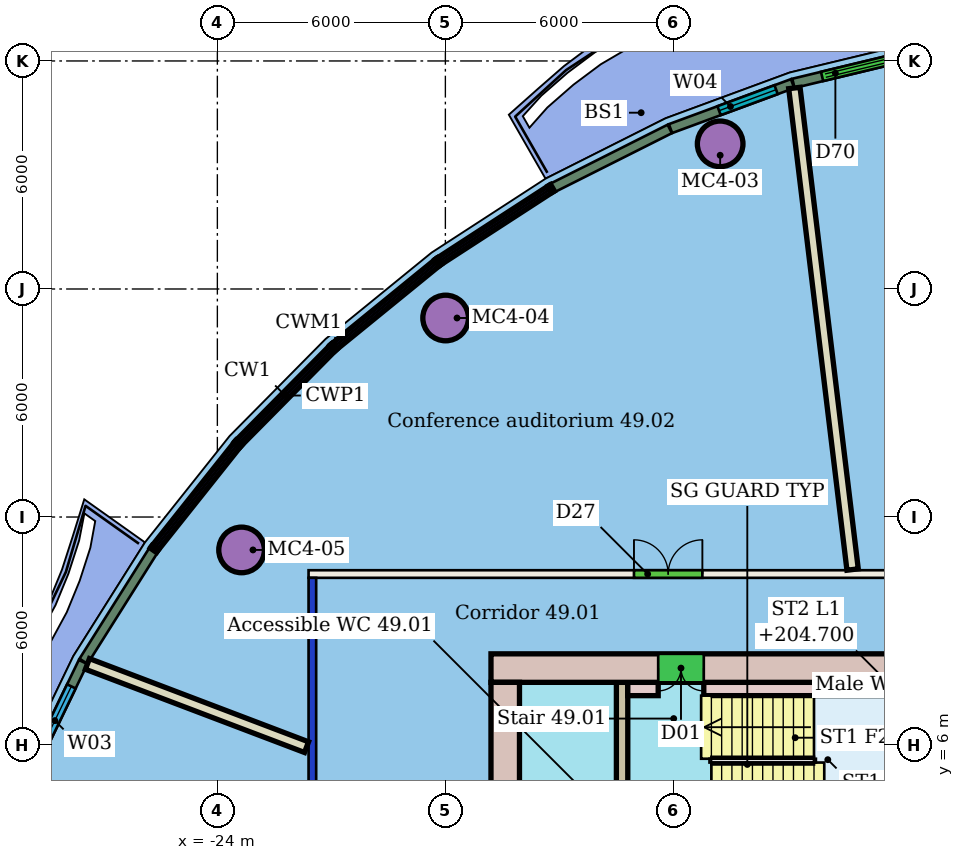
"""IFC4 building model, lengths in metres.
Left out: names, types, materials, properties, quantities, classifications, styles, units other than length and angle.
Written with IfcOpenShell. Run it as: python <this file> out.ifc"""

import sys

from ifc_helpers import new_model, si_unit, direction, frame, frame_2d, origin, origin_2d, place, context, subcontext, project, spatial, rectangle, hollow_circle, extrude, element, fill, save


model = new_model("IFC4")
c1 = context("Model", 3, precision=1e-05, world=origin(), true_north=direction((0.0, 1.0)))
c2 = subcontext(c1, "Body", "Model", "MODEL_VIEW")
j1 = project(units=[si_unit("LENGTHUNIT", "METRE"), si_unit("PLANEANGLEUNIT", "RADIAN")], contexts=[c1])
p1 = place(None, origin())
s1 = spatial("IfcSite", under=j1, at=p1, CompositionType="ELEMENT")
p2 = place(p1, origin())
s2 = spatial("IfcBuilding", under=s1, at=p2, CompositionType="ELEMENT")
p3 = place(p2, frame((0.0, 0.0, 202.9)))
s3 = spatial("IfcBuildingStorey", under=s2, at=p3, CompositionType="ELEMENT", Elevation=202.9)
for number, where, z_axis, x_axis in (
    (1, (-10.769, 21.819, 0.0), (0.0, 0.0, 1.0), (1.0, 0.0, 0.0)),
    (2, (-17.993, 17.237, 0.0), (0.0, 0.0, 1.0), (1.0, 0.0, 0.0)),
    (3, (-23.363, 11.134, 0.0), (0.0, 0.0, 1.0), (1.0, 0.0, 0.0)),
):
    element("IfcColumn", number, at=place(p3, frame(where, z_axis=z_axis, x_axis=x_axis)), inside=s3, PredefinedType="COLUMN", context=c2, shape_type="SweptSolid", body=[
        extrude(hollow_circle(Radius=0.6, WallThickness=0.045, at=origin_2d()), origin(), (0.0, 0.0, 1.0), 3.45),
    ])
p4 = place(p3, frame((-21.5, -10.4, 0.0), z_axis=(0.0, 0.0, 1.0), x_axis=(0.0, 1.0, 0.0)))
e4 = element("IfcWall", 4, at=p4, inside=s3, PredefinedType="PARTITIONING", context=c2, shape_type="SweptSolid", body=[
    extrude(rectangle(XDim=20.8, YDim=0.2, at=frame_2d((10.4, 0.0))), origin(), (0.0, 0.0, 1.0), 3.05),
])
p5 = place(p4, frame((10.391, 0.0, 0.0)))
e5 = element("IfcOpeningElement", 5, at=p5, cuts=e4, PredefinedType="OPENING", context=c2, shape_type="SweptSolid", body=[
    extrude(rectangle(XDim=1.8, YDim=2.4, at=frame_2d((0.9, 1.2))), frame((0.0, 0.11, 0.0), z_axis=(0.0, -1.0, 0.0), x_axis=(1.0, 0.0, 0.0)), (0.0, 0.0, 1.0), 0.22),
])
p6 = place(p3, frame((-21.6, 10.5, 0.0), z_axis=(0.0, 0.0, 1.0), x_axis=(1.0, 0.0, 0.0)))
e6 = element("IfcWall", 6, at=p6, inside=s3, PredefinedType="PARTITIONING", context=c2, shape_type="SweptSolid", body=[
    extrude(rectangle(XDim=31.2, YDim=0.2, at=frame_2d((15.6, 0.0))), origin(), (0.0, 0.0, 1.0), 3.45),
])
p7 = place(p6, frame((18.102, 0.0, 0.0)))
e7 = element("IfcOpeningElement", 7, at=p7, cuts=e6, PredefinedType="OPENING", context=c2, shape_type="SweptSolid", body=[
    extrude(rectangle(XDim=1.5, YDim=2.1, at=frame_2d((0.75, 1.05))), frame((0.0, 0.11, 0.0), z_axis=(0.0, -1.0, 0.0), x_axis=(1.0, 0.0, 0.0)), (0.0, 0.0, 1.0), 0.22),
])
p8 = place(p6, frame((8.563, 0.0, 0.0)))
e8 = element("IfcOpeningElement", 8, at=p8, cuts=e6, PredefinedType="OPENING", context=c2, shape_type="SweptSolid", body=[
    extrude(rectangle(XDim=1.8, YDim=2.4, at=frame_2d((0.9, 1.2))), frame((0.0, 0.11, 0.0), z_axis=(0.0, -1.0, 0.0), x_axis=(1.0, 0.0, 0.0)), (0.0, 0.0, 1.0), 0.22),
])
p9 = place(p6, frame((24.077, 0.0, 0.0)))
e9 = element("IfcOpeningElement", 9, at=p9, cuts=e6, PredefinedType="OPENING", context=c2, shape_type="SweptSolid", body=[
    extrude(rectangle(XDim=1.8, YDim=2.1, at=frame_2d((0.9, 1.05))), frame((0.0, 0.11, 0.0), z_axis=(0.0, -1.0, 0.0), x_axis=(1.0, 0.0, 0.0)), (0.0, 0.0, 1.0), 0.22),
])
p10 = place(p3, frame((-8.816, 23.289, 0.0), z_axis=(0.0, 0.0, 1.0), x_axis=(0.120069156686, -0.992765530029, 0.0)))
e10 = element("IfcWall", 10, at=p10, inside=s3, PredefinedType="PARTITIONING", context=c2, shape_type="SweptSolid", body=[
    extrude(rectangle(XDim=12.763, YDim=0.3, at=frame_2d((6.382, 0.0))), origin(), (0.0, 0.0, 1.0), 3.45),
])
p11 = place(p3, frame((-27.419, 8.134, 0.0), z_axis=(0.0, 0.0, 1.0), x_axis=(0.934858486825, -0.355020576322, 0.0)))
e11 = element("IfcWall", 11, at=p11, inside=s3, PredefinedType="PARTITIONING", context=c2, shape_type="SweptSolid", body=[
    extrude(rectangle(XDim=6.167, YDim=0.3, at=frame_2d((3.083, 0.0))), origin(), (0.0, 0.0, 1.0), 3.45),
])
p12 = place(p3, frame((-5.583, 24.196, 0.0), z_axis=(0.0, 0.0, 1.0), x_axis=(-0.972213814668, -0.234094635926, 0.0)))
e12 = element("IfcWall", 12, at=p12, inside=s3, PredefinedType="SOLIDWALL", context=c2, shape_type="SweptSolid", body=[
    extrude(rectangle(XDim=3.352, YDim=0.25, at=frame_2d((1.676, 0.0))), origin(), (0.0, 0.0, 1.0), 3.1),
])
p13 = place(p12, frame((0.776, 0.0, 0.0)))
e13 = element("IfcOpeningElement", 13, at=p13, cuts=e12, PredefinedType="OPENING", context=c2, shape_type="SweptSolid", body=[
    extrude(rectangle(XDim=1.8, YDim=2.4, at=frame_2d((0.9, 1.2))), frame((0.0, 0.135, 0.0), z_axis=(0.0, -1.0, 0.0), x_axis=(1.0, 0.0, 0.0)), (0.0, 0.0, 1.0), 0.27),
])
p14 = place(p3, frame((-8.863, 23.404, 0.0), z_axis=(0.0, 0.0, 1.0), x_axis=(-0.93828100614, -0.345873898288, 0.0)))
e14 = element("IfcWall", 14, at=p14, inside=s3, PredefinedType="SOLIDWALL", context=c2, shape_type="SweptSolid", body=[
    extrude(rectangle(XDim=3.423, YDim=0.25, at=frame_2d((1.712, 0.0))), origin(), (0.0, 0.0, 1.0), 3.1),
])
p15 = place(p14, frame((0.462, 0.0, 0.9)))
e15 = element("IfcOpeningElement", 15, at=p15, cuts=e14, PredefinedType="OPENING", context=c2, shape_type="SweptSolid", body=[
    extrude(rectangle(XDim=1.6, YDim=2.1, at=frame_2d((0.8, 1.05))), frame((0.0, 0.135, 0.0), z_axis=(0.0, -1.0, 0.0), x_axis=(1.0, 0.0, 0.0)), (0.0, 0.0, 1.0), 0.27),
])
for number, where, z_axis, x_axis in (
    (16, (-12.096, 22.211, 0.0), (0.0, 0.0, 1.0), (-0.893, -0.449, 0.0)),
    (17, (-25.69, 11.112, 0.0), (0.0, 0.0, 1.0), (-0.533, -0.846, 0.0)),
):
    element("IfcWall", number, at=place(p3, frame(where, z_axis=z_axis, x_axis=x_axis)), inside=s3, PredefinedType="SOLIDWALL", context=c2, shape_type="SweptSolid", body=[
        extrude(rectangle(XDim=3.437, YDim=0.25, at=frame_2d((1.718, 0.0))), origin(), (0.0, 0.0, 1.0), 3.1),
    ])
p16 = place(p3, frame((-27.533, 8.185, 0.0), z_axis=(0.0, 0.0, 1.0), x_axis=(-0.434561601859, -0.900642112156, 0.0)))
e18 = element("IfcWall", 18, at=p16, inside=s3, PredefinedType="SOLIDWALL", context=c2, shape_type="SweptSolid", body=[
    extrude(rectangle(XDim=3.424, YDim=0.25, at=frame_2d((1.712, 0.0))), origin(), (0.0, 0.0, 1.0), 3.1),
])
p17 = place(p16, frame((0.712, 0.0, 0.9)))
e19 = element("IfcOpeningElement", 19, at=p17, cuts=e18, PredefinedType="OPENING", context=c2, shape_type="SweptSolid", body=[
    extrude(rectangle(XDim=2.0, YDim=2.1, at=frame_2d((1.0, 1.05))), frame((0.0, 0.135, 0.0), z_axis=(0.0, -1.0, 0.0), x_axis=(1.0, 0.0, 0.0)), (0.0, 0.0, 1.0), 0.27),
])
p18 = place(p3, frame((-6.0, 8.025, 0.0), z_axis=(0.0, 0.0, 1.0), x_axis=(-1.0, 0.0, 0.0)))
e20 = element("IfcWall", 20, at=p18, inside=s3, PredefinedType="SHEAR", context=c2, shape_type="SweptSolid", body=[
    extrude(rectangle(XDim=10.8, YDim=0.75, at=frame_2d((5.4, 0.0))), origin(), (0.0, 0.0, 1.0), 3.3),
])
p19 = place(p18, frame((5.2, 0.0, 0.0)))
e21 = element("IfcOpeningElement", 21, at=p19, cuts=e20, PredefinedType="OPENING", context=c2, shape_type="SweptSolid", body=[
    extrude(rectangle(XDim=1.2, YDim=2.1, at=frame_2d((0.6, 1.05))), frame((0.0, 0.385, 0.0), z_axis=(0.0, -1.0, 0.0), x_axis=(1.0, 0.0, 0.0)), (0.0, 0.0, 1.0), 0.77),
])
p20 = place(p3, frame((-16.425, 7.65, 0.0), z_axis=(0.0, 0.0, 1.0), x_axis=(0.0, -1.0, 0.0)))
e22 = element("IfcWall", 22, at=p20, inside=s3, PredefinedType="SHEAR", context=c2, shape_type="SweptSolid", body=[
    extrude(rectangle(XDim=15.3, YDim=0.75, at=frame_2d((7.65, 0.0))), origin(), (0.0, 0.0, 1.0), 3.3),
])
p21 = place(p20, frame((11.25, 0.0, 0.0)))
e23 = element("IfcOpeningElement", 23, at=p21, cuts=e22, PredefinedType="OPENING", context=c2, shape_type="SweptSolid", body=[
    extrude(rectangle(XDim=1.2, YDim=2.1, at=frame_2d((0.6, 1.05))), frame((0.0, 0.385, 0.0), z_axis=(0.0, -1.0, 0.0), x_axis=(1.0, 0.0, 0.0)), (0.0, 0.0, 1.0), 0.77),
])
p22 = place(p20, frame((2.85, 0.0, 0.0)))
e24 = element("IfcOpeningElement", 24, at=p22, cuts=e22, PredefinedType="OPENING", context=c2, shape_type="SweptSolid", body=[
    extrude(rectangle(XDim=1.2, YDim=2.1, at=frame_2d((0.6, 1.05))), frame((0.0, 0.385, 0.0), z_axis=(0.0, -1.0, 0.0), x_axis=(1.0, 0.0, 0.0)), (0.0, 0.0, 1.0), 0.77),
])
p23 = place(p3, frame((-13.35, 7.65, 0.0), z_axis=(0.0, 0.0, 1.0), x_axis=(0.0, -1.0, 0.0)))
e25 = element("IfcWall", 25, at=p23, inside=s3, PredefinedType="SHEAR", context=c2, shape_type="SweptSolid", body=[
    extrude(rectangle(XDim=15.3, YDim=0.3, at=frame_2d((7.65, 0.0))), origin(), (0.0, 0.0, 1.0), 3.3),
])
p24 = place(p23, frame((6.9, 0.0, 0.0)))
e26 = element("IfcOpeningElement", 26, at=p24, cuts=e25, PredefinedType="OPENING", context=c2, shape_type="SweptSolid", body=[
    extrude(rectangle(XDim=1.5, YDim=2.1, at=frame_2d((0.75, 1.05))), frame((0.0, 0.16, 0.0), z_axis=(0.0, -1.0, 0.0), x_axis=(1.0, 0.0, 0.0)), (0.0, 0.0, 1.0), 0.32),
])
p25 = place(p3, frame((-13.2, 7.475, 0.0), z_axis=(0.0, 0.0, 1.0), x_axis=(1.0, 0.0, 0.0)))
e27 = element("IfcWall", 27, at=p25, inside=s3, PredefinedType="SHEAR", context=c2, shape_type="SweptSolid", body=[
    extrude(rectangle(XDim=0.8, YDim=0.35, at=frame_2d((0.4, 0.0))), origin(), (0.0, 0.0, 1.0), 3.3),
])
p26 = place(p3, frame((-11.2, 7.475, 0.0), z_axis=(0.0, 0.0, 1.0), x_axis=(1.0, 0.0, 0.0)))
e28 = element("IfcWall", 28, at=p26, inside=s3, PredefinedType="SHEAR", context=c2, shape_type="SweptSolid", body=[
    extrude(rectangle(XDim=5.05, YDim=0.35, at=frame_2d((2.525, 0.0))), origin(), (0.0, 0.0, 1.0), 3.3),
])
p27 = place(p8, origin())
e29 = element("IfcDoor", 29, at=p27, inside=s3, OperationType="DOUBLE_DOOR_SINGLE_SWING", PredefinedType="DOOR", context=c2, shape_type="SweptSolid", body=[
    extrude(rectangle(XDim=1.8, YDim=2.4, at=frame_2d((0.9, 1.2))), frame((0.0, 0.025, 0.0), z_axis=(0.0, -1.0, 0.0), x_axis=(1.0, 0.0, 0.0)), (0.0, 0.0, 1.0), 0.05),
])
fill(e8, e29)
p28 = place(p13, origin())
e30 = element("IfcDoor", 30, at=p28, inside=s3, OperationType="DOUBLE_DOOR_SLIDING", PredefinedType="DOOR", context=c2, shape_type="SweptSolid", body=[
    extrude(rectangle(XDim=1.8, YDim=2.4, at=frame_2d((0.9, 1.2))), frame((0.0, 0.025, 0.0), z_axis=(0.0, -1.0, 0.0), x_axis=(1.0, 0.0, 0.0)), (0.0, 0.0, 1.0), 0.05),
])
fill(e13, e30)
p29 = place(p15, origin())
e31 = element("IfcWindow", 31, at=p29, inside=s3, PartitioningType="SINGLE_PANEL", PredefinedType="WINDOW", context=c2, shape_type="SweptSolid", body=[
    extrude(rectangle(XDim=1.6, YDim=2.1, at=frame_2d((0.8, 1.05))), frame((0.0, 0.03, 0.0), z_axis=(0.0, -1.0, 0.0), x_axis=(1.0, 0.0, 0.0)), (0.0, 0.0, 1.0), 0.06),
])
fill(e15, e31)
p30 = place(p17, origin())
e32 = element("IfcWindow", 32, at=p30, inside=s3, PartitioningType="SINGLE_PANEL", PredefinedType="WINDOW", context=c2, shape_type="SweptSolid", body=[
    extrude(rectangle(XDim=2.0, YDim=2.1, at=frame_2d((1.0, 1.05))), frame((0.0, 0.03, 0.0), z_axis=(0.0, -1.0, 0.0), x_axis=(1.0, 0.0, 0.0)), (0.0, 0.0, 1.0), 0.06),
])
fill(e19, e32)
p31 = place(p19, origin())
e33 = element("IfcDoor", 33, at=p31, inside=s3, OperationType="DOUBLE_DOOR_SINGLE_SWING", PredefinedType="NOTDEFINED", context=c2, shape_type="SweptSolid", body=[
    extrude(rectangle(XDim=1.2, YDim=2.1, at=frame_2d((0.6, 1.05))), frame((0.0, 0.025, 0.0), z_axis=(0.0, -1.0, 0.0), x_axis=(1.0, 0.0, 0.0)), (0.0, 0.0, 1.0), 0.05),
])
fill(e21, e33)
save(model, sys.argv[1])
